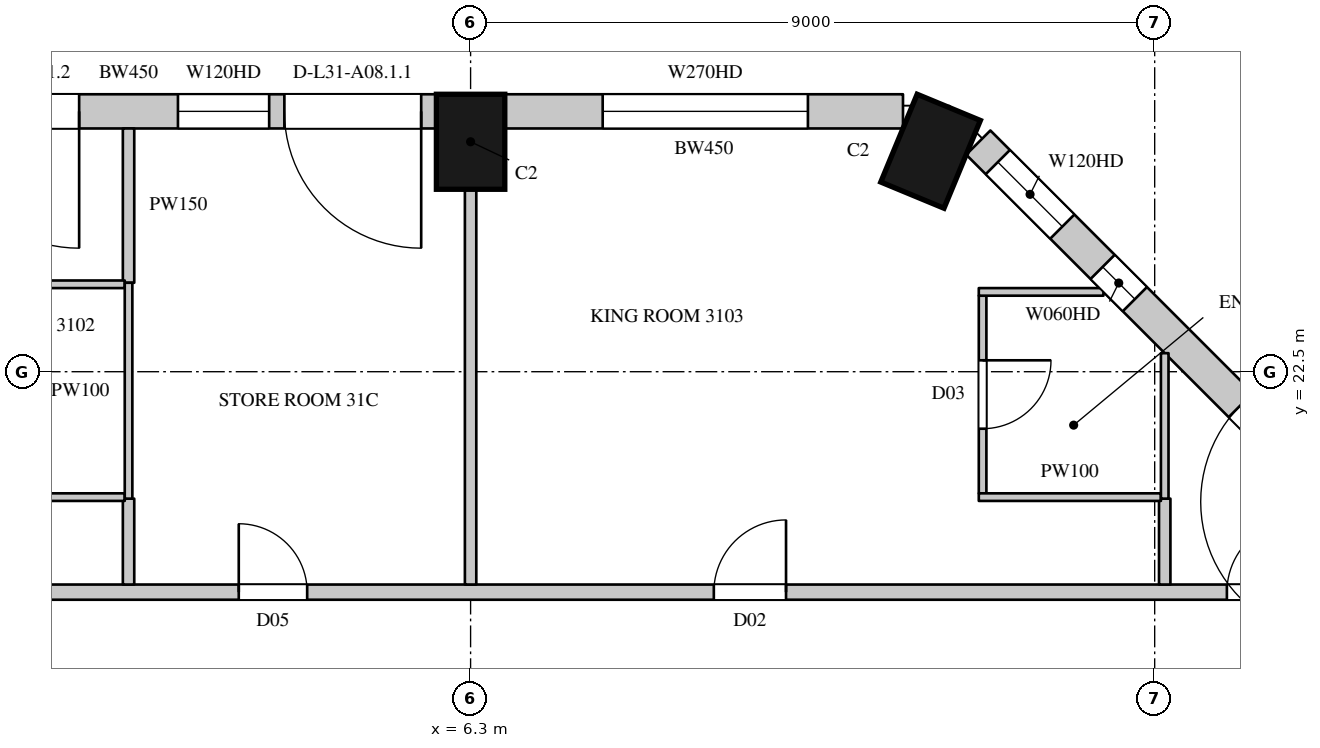
"""IFC4 building model, lengths in metres.
Left out: names, types, materials, properties, quantities, classifications, styles, units other than length and angle.
Written with IfcOpenShell. Run it as: python <this file> out.ifc"""

import sys

from ifc_helpers import new_model, si_unit, direction, frame, frame_2d, origin, origin_2d, place, context, subcontext, project, spatial, rectangle, extrude, element, fill, save


model = new_model("IFC4")
c1 = context("Model", 3, precision=1e-05, world=origin(), true_north=direction((0.0, 1.0)))
c2 = subcontext(c1, "Body", "Model", "MODEL_VIEW")
j1 = project(units=[si_unit("LENGTHUNIT", "METRE"), si_unit("PLANEANGLEUNIT", "RADIAN")], contexts=[c1])
p1 = place(None, origin())
s1 = spatial("IfcSite", under=j1, at=p1, CompositionType="ELEMENT")
p2 = place(p1, origin())
s2 = spatial("IfcBuilding", under=s1, at=p2, CompositionType="ELEMENT")
p3 = place(p2, frame((0.0, 0.0, 141.9)))
s3 = spatial("IfcBuildingStorey", under=s2, at=p3, CompositionType="ELEMENT", Elevation=141.9)
for number, where, z_axis, x_axis in (
    (1, (12.352, 25.4, 0.0), (0.0, 0.0, 1.0), (-0.924, 0.383, 0.0)),
    (2, (6.3, 25.525, 0.0), (0.0, 0.0, 1.0), (-1.0, 0.0, 0.0)),
):
    element("IfcColumn", number, at=place(p3, frame(where, z_axis=z_axis, x_axis=x_axis)), inside=s3, PredefinedType="COLUMN", context=c2, shape_type="SweptSolid", body=[
        extrude(rectangle(XDim=0.9, YDim=1.25, at=origin_2d()), origin(), (0.0, 0.0, 1.0), 3.6),
    ])
p4 = place(p3, frame((18.229, 20.265, 0.0), z_axis=(0.0, 0.0, 1.0), x_axis=(-0.707106781187, 0.707106781187, 0.0)))
e3 = element("IfcWall", 3, at=p4, inside=s3, PredefinedType="SOLIDWALL", context=c2, shape_type="SweptSolid", body=[
    extrude(rectangle(XDim=7.424, YDim=0.45, at=frame_2d((3.712, 0.0))), origin(), (0.0, 0.0, 1.0), 3.3),
])
p5 = place(p4, frame((0.74, 0.0, 0.0)))
e4 = element("IfcOpeningElement", 4, at=p5, cuts=e3, PredefinedType="OPENING", context=c2, shape_type="SweptSolid", body=[
    extrude(rectangle(XDim=1.8, YDim=2.4, at=frame_2d((0.9, 1.2))), frame((0.0, 0.235, 0.0), z_axis=(0.0, -1.0, 0.0), x_axis=(1.0, 0.0, 0.0)), (0.0, 0.0, 1.0), 0.47),
])
p6 = place(p4, frame((4.51, 0.0, 1.05)))
e5 = element("IfcOpeningElement", 5, at=p6, cuts=e3, PredefinedType="OPENING", context=c2, shape_type="SweptSolid", body=[
    extrude(rectangle(XDim=0.6, YDim=2.0, at=frame_2d((0.3, 1.0))), frame((0.0, 0.235, 0.0), z_axis=(0.0, -1.0, 0.0), x_axis=(1.0, 0.0, 0.0)), (0.0, 0.0, 1.0), 0.47),
])
p7 = place(p4, frame((5.861, 0.0, 1.05)))
e6 = element("IfcOpeningElement", 6, at=p7, cuts=e3, PredefinedType="OPENING", context=c2, shape_type="SweptSolid", body=[
    extrude(rectangle(XDim=1.2, YDim=2.0, at=frame_2d((0.6, 1.0))), frame((0.0, 0.235, 0.0), z_axis=(0.0, -1.0, 0.0), x_axis=(1.0, 0.0, 0.0)), (0.0, 0.0, 1.0), 0.47),
])
p8 = place(p3, frame((11.989, 25.925, 0.0), z_axis=(0.0, 0.0, 1.0), x_axis=(-1.0, 0.0, 0.0)))
e7 = element("IfcWall", 7, at=p8, inside=s3, PredefinedType="SOLIDWALL", context=c2, shape_type="SweptSolid", body=[
    extrude(rectangle(XDim=5.239, YDim=0.45, at=frame_2d((2.619, 0.0))), origin(), (0.0, 0.0, 1.0), 3.3),
])
p9 = place(p8, frame((1.251, 0.0, 1.05)))
e8 = element("IfcOpeningElement", 8, at=p9, cuts=e7, PredefinedType="OPENING", context=c2, shape_type="SweptSolid", body=[
    extrude(rectangle(XDim=2.7, YDim=2.0, at=frame_2d((1.35, 1.0))), frame((0.0, 0.235, 0.0), z_axis=(0.0, -1.0, 0.0), x_axis=(1.0, 0.0, 0.0)), (0.0, 0.0, 1.0), 0.47),
])
p10 = place(p3, frame((5.85, 25.925, 0.0), z_axis=(0.0, 0.0, 1.0), x_axis=(-1.0, 0.0, 0.0)))
e9 = element("IfcWall", 9, at=p10, inside=s3, PredefinedType="SOLIDWALL", context=c2, shape_type="SweptSolid", body=[
    extrude(rectangle(XDim=8.1, YDim=0.45, at=frame_2d((4.05, 0.0))), origin(), (0.0, 0.0, 1.0), 3.3),
])
p11 = place(p10, frame((0.2, 0.0, 0.0)))
e10 = element("IfcOpeningElement", 10, at=p11, cuts=e9, PredefinedType="OPENING", context=c2, shape_type="SweptSolid", body=[
    extrude(rectangle(XDim=1.8, YDim=2.4, at=frame_2d((0.9, 1.2))), frame((0.0, 0.235, 0.0), z_axis=(0.0, -1.0, 0.0), x_axis=(1.0, 0.0, 0.0)), (0.0, 0.0, 1.0), 0.47),
])
p12 = place(p10, frame((2.2, 0.0, 1.05)))
e11 = element("IfcOpeningElement", 11, at=p12, cuts=e9, PredefinedType="OPENING", context=c2, shape_type="SweptSolid", body=[
    extrude(rectangle(XDim=1.2, YDim=2.0, at=frame_2d((0.6, 1.0))), frame((0.0, 0.235, 0.0), z_axis=(0.0, -1.0, 0.0), x_axis=(1.0, 0.0, 0.0)), (0.0, 0.0, 1.0), 0.47),
])
p13 = place(p10, frame((4.7, 0.0, 0.0)))
e12 = element("IfcOpeningElement", 12, at=p13, cuts=e9, PredefinedType="OPENING", context=c2, shape_type="SweptSolid", body=[
    extrude(rectangle(XDim=1.8, YDim=2.4, at=frame_2d((0.9, 1.2))), frame((0.0, 0.235, 0.0), z_axis=(0.0, -1.0, 0.0), x_axis=(1.0, 0.0, 0.0)), (0.0, 0.0, 1.0), 0.47),
])
p14 = place(p10, frame((6.7, 0.0, 1.05)))
e13 = element("IfcOpeningElement", 13, at=p14, cuts=e9, PredefinedType="OPENING", context=c2, shape_type="SweptSolid", body=[
    extrude(rectangle(XDim=1.2, YDim=2.0, at=frame_2d((0.6, 1.0))), frame((0.0, 0.235, 0.0), z_axis=(0.0, -1.0, 0.0), x_axis=(1.0, 0.0, 0.0)), (0.0, 0.0, 1.0), 0.47),
])
p15 = place(p3, frame((16.486, 23.529, 0.0), z_axis=(0.0, 0.0, 1.0), x_axis=(-0.707022305137, 0.707191247145, 0.0)))
e14 = element("IfcWall", 14, at=p15, inside=s3, PredefinedType="SOLIDWALL", context=c2, shape_type="SweptSolid", body=[
    extrude(rectangle(XDim=1.445, YDim=0.45, at=frame_2d((0.723, 0.0))), origin(), (0.0, 0.0, 1.0), 0.6),
])
p16 = place(p3, frame((-20.7, 19.6, 0.0), z_axis=(0.0, 0.0, 1.0), x_axis=(1.0, 0.0, 0.0)))
e15 = element("IfcWall", 15, at=p16, inside=s3, PredefinedType="PARTITIONING", context=c2, shape_type="SweptSolid", body=[
    extrude(rectangle(XDim=38.214, YDim=0.2, at=frame_2d((19.107, 0.0))), origin(), (0.0, 0.0, 1.0), 3.3),
])
p17 = place(p16, frame((23.95, 0.0, 0.0)))
e16 = element("IfcOpeningElement", 16, at=p17, cuts=e15, PredefinedType="OPENING", context=c2, shape_type="SweptSolid", body=[
    extrude(rectangle(XDim=0.9, YDim=2.2, at=frame_2d((0.45, 1.1))), frame((0.0, 0.11, 0.0), z_axis=(0.0, -1.0, 0.0), x_axis=(1.0, 0.0, 0.0)), (0.0, 0.0, 1.0), 0.22),
])
p18 = place(p16, frame((2.05, 0.0, 0.0)))
e17 = element("IfcOpeningElement", 17, at=p18, cuts=e15, PredefinedType="OPENING", context=c2, shape_type="SweptSolid", body=[
    extrude(rectangle(XDim=1.1, YDim=2.4, at=frame_2d((0.55, 1.2))), frame((0.0, 0.11, 0.0), z_axis=(0.0, -1.0, 0.0), x_axis=(1.0, 0.0, 0.0)), (0.0, 0.0, 1.0), 0.22),
])
p19 = place(p16, frame((12.15, 0.0, 0.0)))
e18 = element("IfcOpeningElement", 18, at=p19, cuts=e15, PredefinedType="OPENING", context=c2, shape_type="SweptSolid", body=[
    extrude(rectangle(XDim=1.1, YDim=2.4, at=frame_2d((0.55, 1.2))), frame((0.0, 0.11, 0.0), z_axis=(0.0, -1.0, 0.0), x_axis=(1.0, 0.0, 0.0)), (0.0, 0.0, 1.0), 0.22),
])
p20 = place(p16, frame((30.2, 0.0, 0.0)))
e19 = element("IfcOpeningElement", 19, at=p20, cuts=e15, PredefinedType="OPENING", context=c2, shape_type="SweptSolid", body=[
    extrude(rectangle(XDim=0.95, YDim=2.2, at=frame_2d((0.475, 1.1))), frame((0.0, 0.11, 0.0), z_axis=(0.0, -1.0, 0.0), x_axis=(1.0, 0.0, 0.0)), (0.0, 0.0, 1.0), 0.22),
])
p21 = place(p16, frame((36.95, 0.0, 0.0)))
e20 = element("IfcOpeningElement", 20, at=p21, cuts=e15, PredefinedType="OPENING", context=c2, shape_type="SweptSolid", body=[
    extrude(rectangle(XDim=0.95, YDim=2.2, at=frame_2d((0.475, 1.1))), frame((0.0, 0.11, 0.0), z_axis=(0.0, -1.0, 0.0), x_axis=(1.0, 0.0, 0.0)), (0.0, 0.0, 1.0), 0.22),
])
p22 = place(p3, frame((1.8, 19.7, 0.0), z_axis=(0.0, 0.0, 1.0), x_axis=(0.0, 1.0, 0.0)))
e21 = element("IfcWall", 21, at=p22, inside=s3, PredefinedType="PARTITIONING", context=c2, shape_type="SweptSolid", body=[
    extrude(rectangle(XDim=1.13, YDim=0.15, at=frame_2d((0.565, 0.0))), origin(), (0.0, 0.0, 1.0), 3.3),
])
p23 = place(p3, frame((1.8, 23.67, 0.0), z_axis=(0.0, 0.0, 1.0), x_axis=(0.0, 1.0, 0.0)))
e22 = element("IfcWall", 22, at=p23, inside=s3, PredefinedType="PARTITIONING", context=c2, shape_type="SweptSolid", body=[
    extrude(rectangle(XDim=2.03, YDim=0.15, at=frame_2d((1.015, 0.0))), origin(), (0.0, 0.0, 1.0), 3.3),
])
p24 = place(p3, frame((6.3, 19.7, 0.0), z_axis=(0.0, 0.0, 1.0), x_axis=(0.0, 1.0, 0.0)))
e23 = element("IfcWall", 23, at=p24, inside=s3, PredefinedType="PARTITIONING", context=c2, shape_type="SweptSolid", body=[
    extrude(rectangle(XDim=5.2, YDim=0.15, at=frame_2d((2.6, 0.0))), origin(), (0.0, 0.0, 1.0), 2.75),
])
p25 = place(p3, frame((15.432, 19.7, 0.0), z_axis=(0.0, 0.0, 1.0), x_axis=(0.0, 1.0, 0.0)))
e24 = element("IfcWall", 24, at=p25, inside=s3, PredefinedType="PARTITIONING", context=c2, shape_type="SweptSolid", body=[
    extrude(rectangle(XDim=1.13, YDim=0.15, at=frame_2d((0.565, 0.0))), origin(), (0.0, 0.0, 1.0), 3.3),
])
for number, where, z_axis, x_axis in (
    (25, (-0.846, 20.85, 0.0), (0.0, 0.0, 1.0), (1.0, 0.0, 0.0)),
    (26, (-0.846, 23.65, 0.0), (0.0, 0.0, 1.0), (1.0, 0.0, 0.0)),
):
    element("IfcWall", number, at=place(p3, frame(where, z_axis=z_axis, x_axis=x_axis)), inside=s3, PredefinedType="PARTITIONING", context=c2, shape_type="SweptSolid", body=[
        extrude(rectangle(XDim=2.596, YDim=0.1, at=frame_2d((1.298, 0.0))), origin(), (0.0, 0.0, 1.0), 3.3),
    ])
p26 = place(p3, frame((1.8, 20.83, 0.0), z_axis=(0.0, 0.0, 1.0), x_axis=(0.0, 1.0, 0.0)))
e27 = element("IfcWall", 27, at=p26, inside=s3, PredefinedType="PARTITIONING", context=c2, shape_type="SweptSolid", body=[
    extrude(rectangle(XDim=2.84, YDim=0.1, at=frame_2d((1.42, 0.0))), origin(), (0.0, 0.0, 1.0), 3.3),
])
p27 = place(p3, frame((13.036, 20.9, 0.0), z_axis=(0.0, 0.0, 1.0), x_axis=(0.0, 1.0, 0.0)))
e28 = element("IfcWall", 28, at=p27, inside=s3, PredefinedType="PARTITIONING", context=c2, shape_type="SweptSolid", body=[
    extrude(rectangle(XDim=2.6, YDim=0.1, at=frame_2d((1.3, 0.0))), origin(), (0.0, 0.0, 1.0), 3.3),
])
p28 = place(p27, frame((0.85, 0.0, 0.0)))
e29 = element("IfcOpeningElement", 29, at=p28, cuts=e28, PredefinedType="OPENING", context=c2, shape_type="SweptSolid", body=[
    extrude(rectangle(XDim=0.9, YDim=2.2, at=frame_2d((0.45, 1.1))), frame((0.0, 0.06, 0.0), z_axis=(0.0, -1.0, 0.0), x_axis=(1.0, 0.0, 0.0)), (0.0, 0.0, 1.0), 0.12),
])
p29 = place(p3, frame((12.986, 20.85, 0.0), z_axis=(0.0, 0.0, 1.0), x_axis=(1.0, 0.0, 0.0)))
e30 = element("IfcWall", 30, at=p29, inside=s3, PredefinedType="PARTITIONING", context=c2, shape_type="SweptSolid", body=[
    extrude(rectangle(XDim=2.396, YDim=0.1, at=frame_2d((1.198, 0.0))), origin(), (0.0, 0.0, 1.0), 3.3),
])
p30 = place(p3, frame((12.986, 23.55, 0.0), z_axis=(0.0, 0.0, 1.0), x_axis=(1.0, 0.0, 0.0)))
e31 = element("IfcWall", 31, at=p30, inside=s3, PredefinedType="PARTITIONING", context=c2, shape_type="SweptSolid", body=[
    extrude(rectangle(XDim=1.64, YDim=0.1, at=frame_2d((0.82, 0.0))), origin(), (0.0, 0.0, 1.0), 3.3),
])
p31 = place(p3, frame((15.432, 20.83, 0.0), z_axis=(0.0, 0.0, 1.0), x_axis=(0.0, 1.0, 0.0)))
e32 = element("IfcWall", 32, at=p31, inside=s3, PredefinedType="PARTITIONING", context=c2, shape_type="SweptSolid", body=[
    extrude(rectangle(XDim=1.914, YDim=0.1, at=frame_2d((0.957, 0.0))), origin(), (0.0, 0.0, 1.0), 3.3),
])
p32 = place(p5, origin())
e33 = element("IfcDoor", 33, at=p32, inside=s3, OperationType="SLIDING_TO_LEFT", PredefinedType="DOOR", context=c2, shape_type="SweptSolid", body=[
    extrude(rectangle(XDim=1.8, YDim=2.4, at=frame_2d((0.9, 1.2))), frame((0.0, 0.13, 0.0), z_axis=(0.0, -1.0, 0.0), x_axis=(1.0, 0.0, 0.0)), (0.0, 0.0, 1.0), 0.05),
])
fill(e4, e33)
p33 = place(p9, origin())
e34 = element("IfcWindow", 34, at=p33, inside=s3, PartitioningType="SINGLE_PANEL", PredefinedType="WINDOW", context=c2, shape_type="SweptSolid", body=[
    extrude(rectangle(XDim=2.7, YDim=2.0, at=frame_2d((1.35, 1.0))), frame((0.0, 0.135, 0.0), z_axis=(0.0, -1.0, 0.0), x_axis=(1.0, 0.0, 0.0)), (0.0, 0.0, 1.0), 0.06),
])
fill(e8, e34)
p34 = place(p11, origin())
e35 = element("IfcDoor", 35, at=p34, inside=s3, OperationType="SLIDING_TO_LEFT", PredefinedType="DOOR", context=c2, shape_type="SweptSolid", body=[
    extrude(rectangle(XDim=1.8, YDim=2.4, at=frame_2d((0.9, 1.2))), frame((0.0, 0.13, 0.0), z_axis=(0.0, -1.0, 0.0), x_axis=(1.0, 0.0, 0.0)), (0.0, 0.0, 1.0), 0.05),
])
fill(e10, e35)
p35 = place(p12, origin())
e36 = element("IfcWindow", 36, at=p35, inside=s3, PartitioningType="SINGLE_PANEL", PredefinedType="WINDOW", context=c2, shape_type="SweptSolid", body=[
    extrude(rectangle(XDim=1.2, YDim=2.0, at=frame_2d((0.6, 1.0))), frame((0.0, 0.135, 0.0), z_axis=(0.0, -1.0, 0.0), x_axis=(1.0, 0.0, 0.0)), (0.0, 0.0, 1.0), 0.06),
])
fill(e11, e36)
p36 = place(p13, origin())
e37 = element("IfcDoor", 37, at=p36, inside=s3, OperationType="SLIDING_TO_LEFT", PredefinedType="DOOR", context=c2, shape_type="SweptSolid", body=[
    extrude(rectangle(XDim=1.8, YDim=2.4, at=frame_2d((0.9, 1.2))), frame((0.0, 0.13, 0.0), z_axis=(0.0, -1.0, 0.0), x_axis=(1.0, 0.0, 0.0)), (0.0, 0.0, 1.0), 0.05),
])
fill(e12, e37)
p37 = place(p17, origin())
e38 = element("IfcDoor", 38, at=p37, inside=s3, OperationType="SINGLE_SWING_LEFT", PredefinedType="DOOR", context=c2, shape_type="SweptSolid", body=[
    extrude(rectangle(XDim=0.9, YDim=2.2, at=frame_2d((0.45, 1.1))), frame((0.0, 0.025, 0.0), z_axis=(0.0, -1.0, 0.0), x_axis=(1.0, 0.0, 0.0)), (0.0, 0.0, 1.0), 0.05),
])
fill(e16, e38)
p38 = place(p20, origin())
e39 = element("IfcDoor", 39, at=p38, inside=s3, OperationType="SINGLE_SWING_RIGHT", PredefinedType="DOOR", context=c2, shape_type="SweptSolid", body=[
    extrude(rectangle(XDim=0.95, YDim=2.2, at=frame_2d((0.475, 1.1))), frame((0.0, 0.025, 0.0), z_axis=(0.0, -1.0, 0.0), x_axis=(1.0, 0.0, 0.0)), (0.0, 0.0, 1.0), 0.05),
])
fill(e19, e39)
p39 = place(p28, origin())
e40 = element("IfcDoor", 40, at=p39, inside=s3, OperationType="SINGLE_SWING_LEFT", PredefinedType="DOOR", context=c2, shape_type="SweptSolid", body=[
    extrude(rectangle(XDim=0.9, YDim=2.2, at=frame_2d((0.45, 1.1))), frame((0.0, 0.025, 0.0), z_axis=(0.0, -1.0, 0.0), x_axis=(1.0, 0.0, 0.0)), (0.0, 0.0, 1.0), 0.05),
])
fill(e29, e40)
p40 = place(p21, origin())
e41 = element("IfcDoor", 41, at=p40, inside=s3, OperationType="SINGLE_SWING_RIGHT", PredefinedType="DOOR", context=c2, shape_type="SweptSolid", body=[
    extrude(rectangle(XDim=0.95, YDim=2.2, at=frame_2d((0.475, 1.1))), frame((0.0, 0.025, 0.0), z_axis=(0.0, -1.0, 0.0), x_axis=(1.0, 0.0, 0.0)), (0.0, 0.0, 1.0), 0.05),
])
fill(e20, e41)
p41 = place(p6, origin())
e42 = element("IfcWindow", 42, at=p41, inside=s3, PartitioningType="SINGLE_PANEL", PredefinedType="WINDOW", context=c2, shape_type="SweptSolid", body=[
    extrude(rectangle(XDim=0.6, YDim=2.0, at=frame_2d((0.3, 1.0))), frame((0.0, 0.135, 0.0), z_axis=(0.0, -1.0, 0.0), x_axis=(1.0, 0.0, 0.0)), (0.0, 0.0, 1.0), 0.06),
])
fill(e5, e42)
p42 = place(p7, origin())
e43 = element("IfcWindow", 43, at=p42, inside=s3, PartitioningType="SINGLE_PANEL", PredefinedType="WINDOW", context=c2, shape_type="SweptSolid", body=[
    extrude(rectangle(XDim=1.2, YDim=2.0, at=frame_2d((0.6, 1.0))), frame((0.0, 0.135, 0.0), z_axis=(0.0, -1.0, 0.0), x_axis=(1.0, 0.0, 0.0)), (0.0, 0.0, 1.0), 0.06),
])
fill(e6, e43)
save(model, sys.argv[1])
